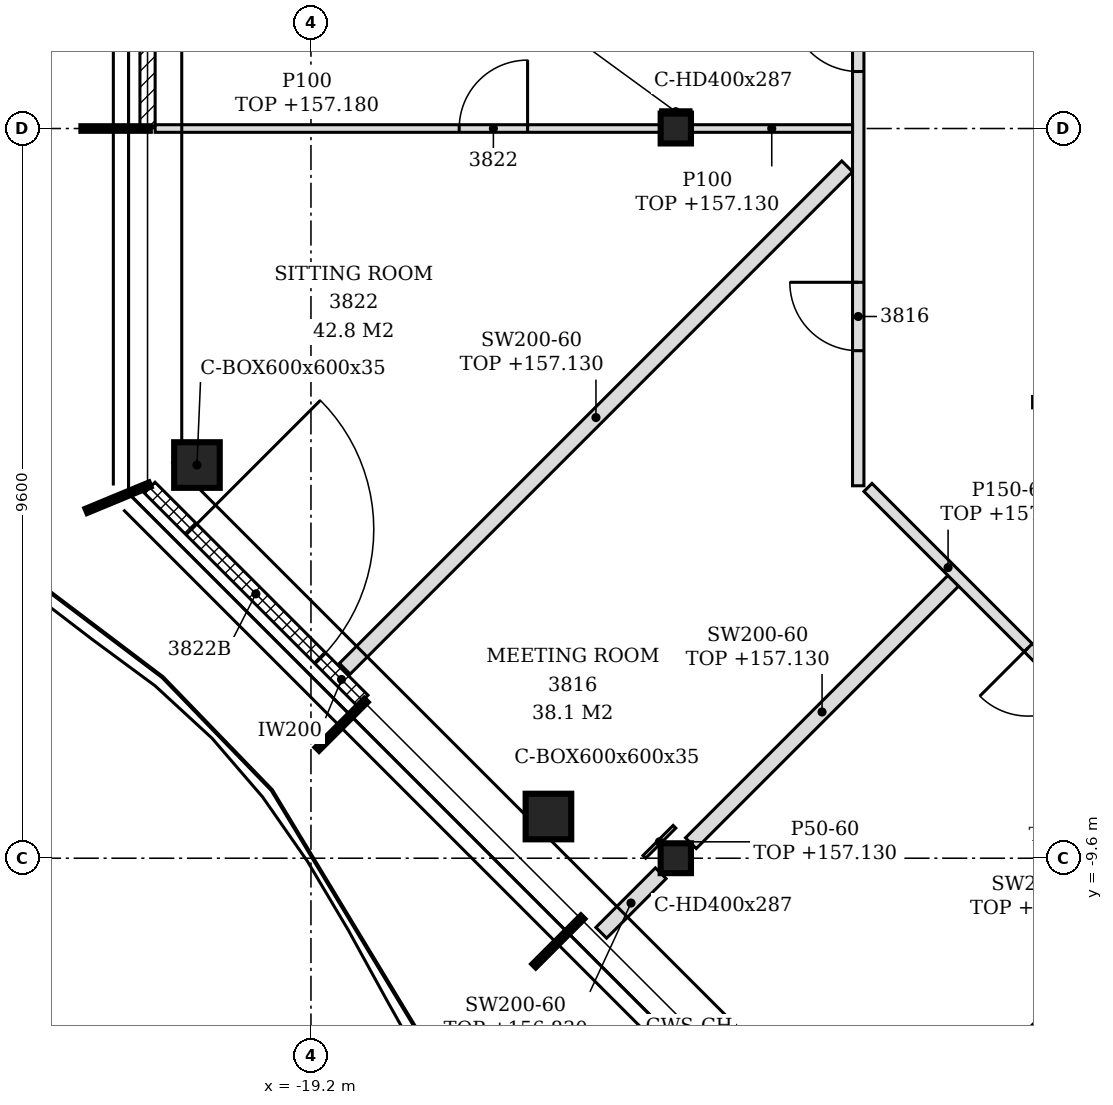
"""IFC4 building model, lengths in metres.
Left out: names, types, materials, properties, quantities, classifications, styles, units other than length and angle.
Written with IfcOpenShell. Run it as: python <this file> out.ifc"""

import sys

from ifc_helpers import new_model, si_unit, direction, frame, frame_2d, origin, origin_2d, place, context, subcontext, project, spatial, polyline, rectangle, hollow_rectangle, i_section, outline, extrude, element, fill, save


model = new_model("IFC4")
c1 = context("Model", 3, precision=1e-05, world=origin(), true_north=direction((0.0, 1.0)))
c2 = subcontext(c1, "Body", "Model", "MODEL_VIEW")
j1 = project(units=[si_unit("LENGTHUNIT", "METRE"), si_unit("PLANEANGLEUNIT", "RADIAN")], contexts=[c1])
p1 = place(None, origin())
s1 = spatial("IfcSite", under=j1, at=p1, CompositionType="ELEMENT")
p2 = place(p1, origin())
s2 = spatial("IfcBuilding", under=s1, at=p2, CompositionType="ELEMENT")
p3 = place(p2, frame((0.0, 0.0, 154.2)))
s3 = spatial("IfcBuildingStorey", under=s2, at=p3, CompositionType="ELEMENT", Elevation=154.2)
for number, where, z_axis, x_axis in (
    (1, (-20.7, -4.427, -0.15), (0.0, 0.0, 1.0), (1.0, 0.0, 0.0)),
    (2, (-16.076, -9.052, -0.15), (0.0, 0.0, 1.0), (1.0, 0.0, 0.0)),
):
    element("IfcColumn", number, at=place(p3, frame(where, z_axis=z_axis, x_axis=x_axis)), inside=s3, PredefinedType="COLUMN", context=c2, shape_type="SweptSolid", body=[
        extrude(hollow_rectangle(XDim=0.6, YDim=0.6, WallThickness=0.035, at=origin_2d()), origin(), (0.0, 0.0, 1.0), 3.6),
    ])
for number, where, z_axis, x_axis in (
    (3, (-14.4, -9.6, -0.15), (0.0, 0.0, 1.0), (1.0, 0.0, 0.0)),
    (4, (-14.4, 0.0, -0.15), (0.0, 0.0, 1.0), (1.0, 0.0, 0.0)),
):
    element("IfcColumn", number, at=place(p3, frame(where, z_axis=z_axis, x_axis=x_axis)), inside=s3, PredefinedType="COLUMN", context=c2, shape_type="SweptSolid", body=[
        extrude(i_section(OverallWidth=0.399, OverallDepth=0.393, WebThickness=0.023, FlangeThickness=0.037, FilletRadius=0.015, at=origin_2d()), origin(), (0.0, 0.0, 1.0), 3.6),
    ])
p4 = place(p3, frame((-21.35, 4.77, 0.0), z_axis=(0.0, 0.0, 1.0), x_axis=(0.0, -1.0, 0.0)))
e5 = element("IfcWall", 5, at=p4, inside=s3, PredefinedType="NOTDEFINED", context=c2, shape_type="SweptSolid", body=[
    extrude(rectangle(XDim=4.74, YDim=0.2, at=frame_2d((2.37, 0.0))), origin(), (0.0, 0.0, 1.0), 3.45),
])
p5 = place(p4, frame((1.17, 0.0, 0.0)))
e6 = element("IfcOpeningElement", 6, at=p5, cuts=e5, PredefinedType="OPENING", context=c2, shape_type="SweptSolid", body=[
    extrude(rectangle(XDim=2.4, YDim=2.4, at=frame_2d((1.2, 1.2))), frame((0.0, 0.11, 0.0), z_axis=(0.0, -1.0, 0.0), x_axis=(1.0, 0.0, 0.0)), (0.0, 0.0, 1.0), 0.22),
])
p6 = place(p3, frame((-21.322, -4.725, 0.0), z_axis=(0.0, 0.0, 1.0), x_axis=(0.707106781187, -0.707106781187, 0.0)))
e7 = element("IfcWall", 7, at=p6, inside=s3, PredefinedType="NOTDEFINED", context=c2, shape_type="SweptSolid", body=[
    extrude(rectangle(XDim=3.962, YDim=0.2, at=frame_2d((1.981, 0.0))), origin(), (0.0, 0.0, 1.0), 3.45),
])
p7 = place(p6, frame((0.775, 0.0, 0.0)))
e8 = element("IfcOpeningElement", 8, at=p7, cuts=e7, PredefinedType="OPENING", context=c2, shape_type="SweptSolid", body=[
    extrude(rectangle(XDim=2.4, YDim=2.4, at=frame_2d((1.2, 1.2))), frame((0.0, 0.11, 0.0), z_axis=(0.0, -1.0, 0.0), x_axis=(1.0, 0.0, 0.0)), (0.0, 0.0, 1.0), 0.22),
])
p8 = place(p3, frame((-11.152, -13.375, 0.0), z_axis=(0.0, 0.0, 1.0), x_axis=(0.707106781187, 0.707106781187, 0.0)))
e9 = element("IfcWall", 9, at=p8, inside=s3, PredefinedType="PARTITIONING", context=c2, shape_type="SweptSolid", body=[
    extrude(rectangle(XDim=6.83, YDim=0.2, at=frame_2d((3.415, 0.0))), origin(), (0.0, 0.0, 1.0), 2.93),
])
p9 = place(p3, frame((-15.381, -10.581, 0.0), z_axis=(0.0, 0.0, 1.0), x_axis=(0.707217034054, 0.706996511125, 0.0)))
e10 = element("IfcWall", 10, at=p9, inside=s3, PredefinedType="PARTITIONING", context=c2, shape_type="SweptSolid", body=[
    extrude(rectangle(XDim=1.107, YDim=0.2, at=frame_2d((0.554, 0.0))), origin(), (0.0, 0.0, 1.0), 2.63),
])
p10 = place(p3, frame((-14.202, -9.402, 0.0), z_axis=(0.0, 0.0, 1.0), x_axis=(0.707081776084, 0.707131785404, 0.0)))
e11 = element("IfcWall", 11, at=p10, inside=s3, PredefinedType="PARTITIONING", context=c2, shape_type="SweptSolid", body=[
    extrude(rectangle(XDim=4.882, YDim=0.2, at=frame_2d((2.441, 0.0))), origin(), (0.0, 0.0, 1.0), 2.93),
])
p11 = place(p3, frame((-8.322, -8.272, 0.0), z_axis=(0.0, 0.0, 1.0), x_axis=(-0.707106781187, 0.707106781187, 0.0)))
e12 = element("IfcWall", 12, at=p11, inside=s3, PredefinedType="PARTITIONING", context=c2, shape_type="SweptSolid", body=[
    extrude(rectangle(XDim=5.021, YDim=0.15, at=frame_2d((2.51, 0.0))), origin(), (0.0, 0.0, 1.0), 2.93),
])
p12 = place(p11, frame((1.139, 0.0, 0.0)))
e13 = element("IfcOpeningElement", 13, at=p12, cuts=e12, PredefinedType="OPENING", context=c2, shape_type="SweptSolid", body=[
    extrude(rectangle(XDim=0.9, YDim=2.1, at=frame_2d((0.45, 1.05))), frame((0.0, 0.085, 0.0), z_axis=(0.0, -1.0, 0.0), x_axis=(1.0, 0.0, 0.0)), (0.0, 0.0, 1.0), 0.17),
])
p13 = place(p3, frame((-18.755, -7.107, 0.0), z_axis=(0.0, 0.0, 1.0), x_axis=(0.707106781187, 0.707106781187, 0.0)))
e14 = element("IfcWall", 14, at=p13, inside=s3, PredefinedType="PARTITIONING", context=c2, shape_type="SweptSolid", body=[
    extrude(rectangle(XDim=9.347, YDim=0.2, at=frame_2d((4.674, 0.0))), origin(), (0.0, 0.0, 1.0), 2.93),
])
p14 = place(p3, frame((-12.0, -4.7, 0.0), z_axis=(0.0, 0.0, 1.0), x_axis=(0.0, 1.0, 0.0)))
e15 = element("IfcWall", 15, at=p14, inside=s3, PredefinedType="PARTITIONING", context=c2, shape_type="SweptSolid", body=[
    extrude(outline(polyline([(0.0, 0.0), (13.913, 0.0), (13.913, 3.45), (9.6, 3.45), (9.598, 2.93), (9.4, 2.93), (9.398, 3.45), (4.8, 3.45), (4.798, 2.93), (4.6, 2.93), (4.598, 3.45), (0.0, 3.45), (0.0, 0.0)])), frame((0.0, 0.075, 0.0), z_axis=(0.0, -1.0, 0.0), x_axis=(1.0, 0.0, 0.0)), (0.0, 0.0, 1.0), 0.15),
])
p15 = place(p14, frame((12.347, 0.0, 0.0)))
e16 = element("IfcOpeningElement", 16, at=p15, cuts=e15, PredefinedType="OPENING", context=c2, shape_type="SweptSolid", body=[
    extrude(rectangle(XDim=0.9, YDim=2.1, at=frame_2d((0.45, 1.05))), frame((0.0, 0.085, 0.0), z_axis=(0.0, -1.0, 0.0), x_axis=(1.0, 0.0, 0.0)), (0.0, 0.0, 1.0), 0.17),
])
p16 = place(p14, frame((5.45, 0.0, 0.0)))
e17 = element("IfcOpeningElement", 17, at=p16, cuts=e15, PredefinedType="OPENING", context=c2, shape_type="SweptSolid", body=[
    extrude(rectangle(XDim=0.9, YDim=2.1, at=frame_2d((0.45, 1.05))), frame((0.0, 0.085, 0.0), z_axis=(0.0, -1.0, 0.0), x_axis=(1.0, 0.0, 0.0)), (0.0, 0.0, 1.0), 0.17),
])
p17 = place(p14, frame((1.777, 0.0, 0.0)))
e18 = element("IfcOpeningElement", 18, at=p17, cuts=e15, PredefinedType="OPENING", context=c2, shape_type="SweptSolid", body=[
    extrude(rectangle(XDim=0.9, YDim=2.1, at=frame_2d((0.45, 1.05))), frame((0.0, 0.085, 0.0), z_axis=(0.0, -1.0, 0.0), x_axis=(1.0, 0.0, 0.0)), (0.0, 0.0, 1.0), 0.17),
])
p18 = place(p3, frame((-9.706, -3.6, 0.0), z_axis=(0.0, 0.0, 1.0), x_axis=(1.0, 0.0, 0.0)))
e19 = element("IfcWall", 19, at=p18, inside=s3, PredefinedType="PARTITIONING", context=c2, shape_type="SweptSolid", body=[
    extrude(outline(polyline([(0.0, 0.0), (4.981, 0.0), (4.981, 2.83), (4.756, 2.83), (4.754, 3.45), (0.0, 3.45), (0.0, 0.0)])), frame((0.0, 0.075, 0.0), z_axis=(0.0, -1.0, 0.0), x_axis=(1.0, 0.0, 0.0)), (0.0, 0.0, 1.0), 0.15),
])
p19 = place(p3, frame((-21.25, 0.0, 0.0), z_axis=(0.0, 0.0, 1.0), x_axis=(1.0, 0.0, 0.0)))
e20 = element("IfcWall", 20, at=p19, inside=s3, PredefinedType="PARTITIONING", context=c2, shape_type="SweptSolid", body=[
    extrude(outline(polyline([(0.0, 0.0), (6.65, 0.0), (6.65, 2.98), (0.7, 2.98), (0.698, 2.93), (0.4, 2.93), (0.398, 2.98), (0.0, 2.98), (0.0, 0.0)])), frame((0.0, 0.05, 0.0), z_axis=(0.0, -1.0, 0.0), x_axis=(1.0, 0.0, 0.0)), (0.0, 0.0, 1.0), 0.1),
])
p20 = place(p19, frame((4.0, 0.0, 0.0)))
e21 = element("IfcOpeningElement", 21, at=p20, cuts=e20, PredefinedType="OPENING", context=c2, shape_type="SweptSolid", body=[
    extrude(rectangle(XDim=0.9, YDim=2.1, at=frame_2d((0.45, 1.05))), frame((0.0, 0.06, 0.0), z_axis=(0.0, -1.0, 0.0), x_axis=(1.0, 0.0, 0.0)), (0.0, 0.0, 1.0), 0.12),
])
p21 = place(p3, frame((-14.2, 0.0, 0.0), z_axis=(0.0, 0.0, 1.0), x_axis=(1.0, 0.0, 0.0)))
e22 = element("IfcWall", 22, at=p21, inside=s3, PredefinedType="PARTITIONING", context=c2, shape_type="SweptSolid", body=[
    extrude(rectangle(XDim=2.125, YDim=0.1, at=frame_2d((1.063, 0.0))), origin(), (0.0, 0.0, 1.0), 2.93),
])
p22 = place(p3, frame((-14.814, -9.582, 0.0), z_axis=(0.0, 0.0, 1.0), x_axis=(0.707106781187, 0.707106781187, 0.0)))
e23 = element("IfcWall", 23, at=p22, inside=s3, PredefinedType="PARTITIONING", context=c2, shape_type="SweptSolid", body=[
    extrude(rectangle(XDim=0.56, YDim=0.05, at=frame_2d((0.28, 0.0))), origin(), (0.0, 0.0, 1.0), 2.93),
])
p23 = place(p3, frame((-14.6, 0.221, 0.0), z_axis=(0.0, 0.0, 1.0), x_axis=(1.0, 0.0, 0.0)))
e24 = element("IfcWall", 24, at=p23, inside=s3, PredefinedType="PARTITIONING", context=c2, shape_type="SweptSolid", body=[
    extrude(rectangle(XDim=0.399, YDim=0.05, at=frame_2d((0.2, 0.0))), origin(), (0.0, 0.0, 1.0), 2.93),
])
p24 = place(p7, origin())
e25 = element("IfcDoor", 25, at=p24, inside=s3, OperationType="SINGLE_SWING_LEFT", PredefinedType="DOOR", context=c2, shape_type="SweptSolid", body=[
    extrude(rectangle(XDim=2.4, YDim=2.4, at=frame_2d((1.2, 1.2))), frame((0.0, 0.025, 0.0), z_axis=(0.0, -1.0, 0.0), x_axis=(1.0, 0.0, 0.0)), (0.0, 0.0, 1.0), 0.05),
])
fill(e8, e25)
p25 = place(p16, origin())
e26 = element("IfcDoor", 26, at=p25, inside=s3, OperationType="SINGLE_SWING_RIGHT", PredefinedType="DOOR", context=c2, shape_type="SweptSolid", body=[
    extrude(rectangle(XDim=0.9, YDim=2.1, at=frame_2d((0.45, 1.05))), frame((0.0, 0.025, 0.0), z_axis=(0.0, -1.0, 0.0), x_axis=(1.0, 0.0, 0.0)), (0.0, 0.0, 1.0), 0.05),
])
fill(e17, e26)
p26 = place(p17, origin())
e27 = element("IfcDoor", 27, at=p26, inside=s3, OperationType="SINGLE_SWING_RIGHT", PredefinedType="DOOR", context=c2, shape_type="SweptSolid", body=[
    extrude(rectangle(XDim=0.9, YDim=2.1, at=frame_2d((0.45, 1.05))), frame((0.0, 0.025, 0.0), z_axis=(0.0, -1.0, 0.0), x_axis=(1.0, 0.0, 0.0)), (0.0, 0.0, 1.0), 0.05),
])
fill(e18, e27)
p27 = place(p12, origin())
e28 = element("IfcDoor", 28, at=p27, inside=s3, OperationType="SINGLE_SWING_RIGHT", PredefinedType="DOOR", context=c2, shape_type="SweptSolid", body=[
    extrude(rectangle(XDim=0.9, YDim=2.1, at=frame_2d((0.45, 1.05))), frame((0.0, 0.025, 0.0), z_axis=(0.0, -1.0, 0.0), x_axis=(1.0, 0.0, 0.0)), (0.0, 0.0, 1.0), 0.05),
])
fill(e13, e28)
p28 = place(p20, origin())
e29 = element("IfcDoor", 29, at=p28, inside=s3, OperationType="SINGLE_SWING_RIGHT", PredefinedType="DOOR", context=c2, shape_type="SweptSolid", body=[
    extrude(rectangle(XDim=0.9, YDim=2.1, at=frame_2d((0.45, 1.05))), frame((0.0, 0.025, 0.0), z_axis=(0.0, -1.0, 0.0), x_axis=(1.0, 0.0, 0.0)), (0.0, 0.0, 1.0), 0.05),
])
fill(e21, e29)
save(model, sys.argv[1])
